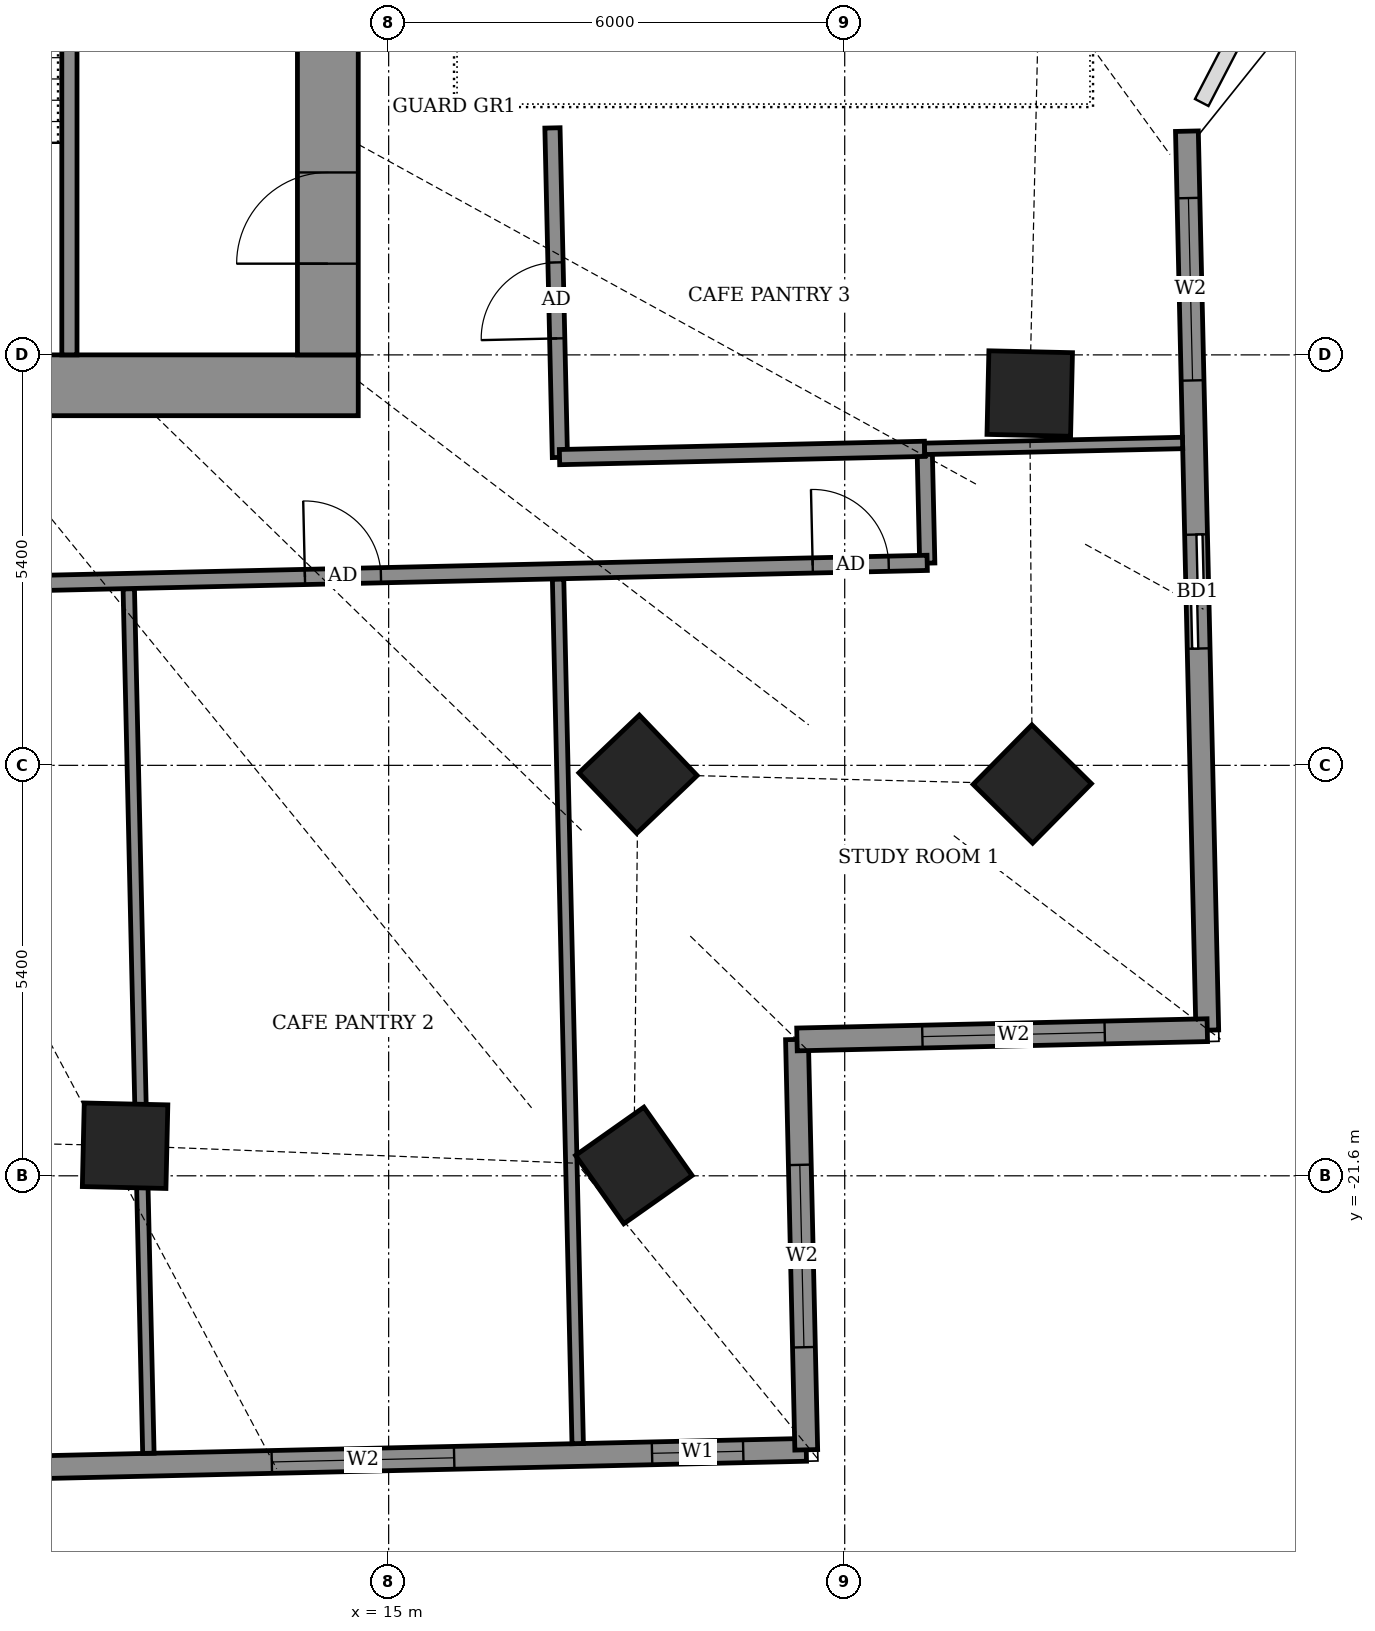
"""IFC4 building model, lengths in metres.
Left out: names, types, materials, properties, quantities, classifications, styles, units other than length and angle.
Written with IfcOpenShell. Run it as: python <this file> out.ifc"""

import sys

from ifc_helpers import new_model, si_unit, direction, frame, frame_2d, origin, origin_2d, place, context, subcontext, project, spatial, rectangle, extrude, element, fill, save


model = new_model("IFC4")
c1 = context("Model", 3, precision=1e-05, world=origin(), true_north=direction((0.0, 1.0)))
c2 = subcontext(c1, "Body", "Model", "MODEL_VIEW")
j1 = project(units=[si_unit("LENGTHUNIT", "METRE"), si_unit("PLANEANGLEUNIT", "RADIAN")], contexts=[c1])
p1 = place(None, origin())
s1 = spatial("IfcSite", under=j1, at=p1, CompositionType="ELEMENT")
p2 = place(p1, origin())
s2 = spatial("IfcBuilding", under=s1, at=p2, CompositionType="ELEMENT")
p3 = place(p2, frame((0.0, 0.0, 226.5)))
s3 = spatial("IfcBuildingStorey", under=s2, at=p3, CompositionType="ELEMENT", Elevation=226.5)
for number, where, z_axis, x_axis in (
    (1, (11.532, -21.204, -0.55), (0.0, 0.0, 1.0), (1.0, -0.023, 0.0)),
    (2, (18.226, -21.464, -0.55), (0.0, 0.0, 1.0), (0.817, 0.577, 0.0)),
    (3, (18.281, -16.316, -0.55), (0.0, 0.0, 1.0), (0.723, 0.691, 0.0)),
    (4, (23.468, -16.446, -0.55), (0.0, 0.0, 1.0), (0.702, 0.712, 0.0)),
    (5, (23.434, -11.309, -0.55), (0.0, 0.0, 1.0), (0.023, 1.0, 0.0)),
):
    element("IfcColumn", number, at=place(p3, frame(where, z_axis=z_axis, x_axis=x_axis)), inside=s3, PredefinedType="COLUMN", context=c2, shape_type="SweptSolid", body=[
        extrude(rectangle(XDim=1.1, YDim=1.1, at=origin_2d()), origin(), (0.0, 0.0, 1.0), 4.6),
    ])
p4 = place(p3, frame((25.77, -19.684, 0.0), z_axis=(0.0, 0.0, 1.0), x_axis=(-0.022659525999, 0.999743239978, 0.0)))
e6 = element("IfcWall", 6, at=p4, inside=s3, PredefinedType="SOLIDWALL", context=c2, shape_type="SweptSolid", body=[
    extrude(rectangle(XDim=11.83, YDim=0.3, at=frame_2d((5.915, 0.0))), origin(), (0.0, 0.0, 1.0), 2.85),
])
p5 = place(p4, frame((5.022, 0.0, 0.0)))
e7 = element("IfcOpeningElement", 7, at=p5, cuts=e6, PredefinedType="OPENING", context=c2, shape_type="SweptSolid", body=[
    extrude(rectangle(XDim=1.5, YDim=2.4, at=frame_2d((0.75, 1.2))), frame((0.0, 0.16, 0.0), z_axis=(0.0, -1.0, 0.0), x_axis=(1.0, 0.0, 0.0)), (0.0, 0.0, 1.0), 0.32),
])
p6 = place(p4, frame((8.55, 0.0, 0.9)))
e8 = element("IfcOpeningElement", 8, at=p6, cuts=e6, PredefinedType="OPENING", context=c2, shape_type="SweptSolid", body=[
    extrude(rectangle(XDim=2.4, YDim=1.5, at=frame_2d((1.2, 0.75))), frame((0.0, 0.16, 0.0), z_axis=(0.0, -1.0, 0.0), x_axis=(1.0, 0.0, 0.0)), (0.0, 0.0, 1.0), 0.32),
])
p7 = place(p3, frame((-23.403, -26.201, 0.0), z_axis=(0.0, 0.0, 1.0), x_axis=(0.999742770494, 0.022680230258, 0.0)))
e9 = element("IfcWall", 9, at=p7, inside=s3, PredefinedType="SOLIDWALL", context=c2, shape_type="SweptSolid", body=[
    extrude(rectangle(XDim=43.908, YDim=0.3, at=frame_2d((21.954, 0.0))), origin(), (0.0, 0.0, 1.0), 2.85),
])
p8 = place(p7, frame((2.0, 0.0, 0.0)))
e10 = element("IfcOpeningElement", 10, at=p8, cuts=e9, PredefinedType="OPENING", context=c2, shape_type="SweptSolid", body=[
    extrude(rectangle(XDim=1.5, YDim=2.4, at=frame_2d((0.75, 1.2))), frame((0.0, 0.16, 0.0), z_axis=(0.0, -1.0, 0.0), x_axis=(1.0, 0.0, 0.0)), (0.0, 0.0, 1.0), 0.32),
])
p9 = place(p7, frame((8.375, 0.0, 0.9)))
e11 = element("IfcOpeningElement", 11, at=p9, cuts=e9, PredefinedType="OPENING", context=c2, shape_type="SweptSolid", body=[
    extrude(rectangle(XDim=2.4, YDim=1.5, at=frame_2d((1.2, 0.75))), frame((0.0, 0.16, 0.0), z_axis=(0.0, -1.0, 0.0), x_axis=(1.0, 0.0, 0.0)), (0.0, 0.0, 1.0), 0.32),
])
p10 = place(p7, frame((15.2, 0.0, 0.0)))
e12 = element("IfcOpeningElement", 12, at=p10, cuts=e9, PredefinedType="OPENING", context=c2, shape_type="SweptSolid", body=[
    extrude(rectangle(XDim=1.5, YDim=2.4, at=frame_2d((0.75, 1.2))), frame((0.0, 0.16, 0.0), z_axis=(0.0, -1.0, 0.0), x_axis=(1.0, 0.0, 0.0)), (0.0, 0.0, 1.0), 0.32),
])
p11 = place(p7, frame((20.1, 0.0, 0.0)))
e13 = element("IfcOpeningElement", 13, at=p11, cuts=e9, PredefinedType="OPENING", context=c2, shape_type="SweptSolid", body=[
    extrude(rectangle(XDim=1.5, YDim=2.4, at=frame_2d((0.75, 1.2))), frame((0.0, 0.16, 0.0), z_axis=(0.0, -1.0, 0.0), x_axis=(1.0, 0.0, 0.0)), (0.0, 0.0, 1.0), 0.32),
])
p12 = place(p7, frame((24.975, 0.0, 0.0)))
e14 = element("IfcOpeningElement", 14, at=p12, cuts=e9, PredefinedType="OPENING", context=c2, shape_type="SweptSolid", body=[
    extrude(rectangle(XDim=1.5, YDim=2.4, at=frame_2d((0.75, 1.2))), frame((0.0, 0.16, 0.0), z_axis=(0.0, -1.0, 0.0), x_axis=(1.0, 0.0, 0.0)), (0.0, 0.0, 1.0), 0.32),
])
p13 = place(p7, frame((30.5, 0.0, 0.9)))
e15 = element("IfcOpeningElement", 15, at=p13, cuts=e9, PredefinedType="OPENING", context=c2, shape_type="SweptSolid", body=[
    extrude(rectangle(XDim=2.4, YDim=1.5, at=frame_2d((1.2, 0.75))), frame((0.0, 0.16, 0.0), z_axis=(0.0, -1.0, 0.0), x_axis=(1.0, 0.0, 0.0)), (0.0, 0.0, 1.0), 0.32),
])
p14 = place(p7, frame((36.875, 0.0, 0.9)))
e16 = element("IfcOpeningElement", 16, at=p14, cuts=e9, PredefinedType="OPENING", context=c2, shape_type="SweptSolid", body=[
    extrude(rectangle(XDim=2.4, YDim=1.5, at=frame_2d((1.2, 0.75))), frame((0.0, 0.16, 0.0), z_axis=(0.0, -1.0, 0.0), x_axis=(1.0, 0.0, 0.0)), (0.0, 0.0, 1.0), 0.32),
])
p15 = place(p7, frame((41.879, 0.0, 0.9)))
e17 = element("IfcOpeningElement", 17, at=p15, cuts=e9, PredefinedType="OPENING", context=c2, shape_type="SweptSolid", body=[
    extrude(rectangle(XDim=1.2, YDim=1.5, at=frame_2d((0.6, 0.75))), frame((0.0, 0.16, 0.0), z_axis=(0.0, -1.0, 0.0), x_axis=(1.0, 0.0, 0.0)), (0.0, 0.0, 1.0), 0.32),
])
p16 = place(p3, frame((20.494, -25.205, 0.0), z_axis=(0.0, 0.0, 1.0), x_axis=(-0.022558128916, 0.999745533033, 0.0)))
e18 = element("IfcWall", 18, at=p16, inside=s3, PredefinedType="SOLIDWALL", context=c2, shape_type="SweptSolid", body=[
    extrude(rectangle(XDim=5.401, YDim=0.3, at=frame_2d((2.7, 0.0))), origin(), (0.0, 0.0, 1.0), 2.85),
])
p17 = place(p16, frame((1.35, 0.0, 0.9)))
e19 = element("IfcOpeningElement", 19, at=p17, cuts=e18, PredefinedType="OPENING", context=c2, shape_type="SweptSolid", body=[
    extrude(rectangle(XDim=2.4, YDim=1.5, at=frame_2d((1.2, 0.75))), frame((0.0, 0.16, 0.0), z_axis=(0.0, -1.0, 0.0), x_axis=(1.0, 0.0, 0.0)), (0.0, 0.0, 1.0), 0.32),
])
p18 = place(p3, frame((20.372, -19.806, 0.0), z_axis=(0.0, 0.0, 1.0), x_axis=(0.999745417973, 0.02256322766, 0.0)))
e20 = element("IfcWall", 20, at=p18, inside=s3, PredefinedType="SOLIDWALL", context=c2, shape_type="SweptSolid", body=[
    extrude(rectangle(XDim=5.399, YDim=0.3, at=frame_2d((2.7, 0.0))), origin(), (0.0, 0.0, 1.0), 2.85),
])
p19 = place(p18, frame((1.65, 0.0, 0.9)))
e21 = element("IfcOpeningElement", 21, at=p19, cuts=e20, PredefinedType="OPENING", context=c2, shape_type="SweptSolid", body=[
    extrude(rectangle(XDim=2.4, YDim=1.5, at=frame_2d((1.2, 0.75))), frame((0.0, 0.16, 0.0), z_axis=(0.0, -1.0, 0.0), x_axis=(1.0, 0.0, 0.0)), (0.0, 0.0, 1.0), 0.32),
])
p20 = place(p3, frame((11.839, -25.251, 0.0), z_axis=(0.0, 0.0, 1.0), x_axis=(-0.022684355347, 0.999742676904, 0.0)))
e22 = element("IfcWall", 22, at=p20, inside=s3, PredefinedType="PARTITIONING", context=c2, shape_type="SweptSolid", body=[
    extrude(rectangle(XDim=11.376, YDim=0.15, at=frame_2d((5.688, 0.0))), origin(), (0.0, 0.0, 1.0), 2.85),
])
p21 = place(p3, frame((17.487, -25.123, 0.0), z_axis=(0.0, 0.0, 1.0), x_axis=(-0.022684355347, 0.999742676904, 0.0)))
e23 = element("IfcWall", 23, at=p21, inside=s3, PredefinedType="PARTITIONING", context=c2, shape_type="SweptSolid", body=[
    extrude(rectangle(XDim=11.376, YDim=0.15, at=frame_2d((5.688, 0.0))), origin(), (0.0, 0.0, 1.0), 2.55),
])
p22 = place(p3, frame((22.086, -13.54, 0.0), z_axis=(0.0, 0.0, 1.0), x_axis=(-0.022617910375, 0.999744182344, 0.0)))
e24 = element("IfcWall", 24, at=p22, inside=s3, PredefinedType="PARTITIONING", context=c2, shape_type="SweptSolid", body=[
    extrude(rectangle(XDim=1.5, YDim=0.2, at=frame_2d((0.75, 0.0))), origin(), (0.0, 0.0, 1.0), 2.85),
])
p23 = place(p3, frame((-27.016, -14.65, 0.0), z_axis=(0.0, 0.0, 1.0), x_axis=(0.999742722722, 0.022682335961, 0.0)))
e25 = element("IfcWall", 25, at=p23, inside=s3, PredefinedType="PARTITIONING", context=c2, shape_type="SweptSolid", body=[
    extrude(rectangle(XDim=49.114, YDim=0.2, at=frame_2d((24.557, 0.0))), origin(), (0.0, 0.0, 1.0), 2.55),
])
p24 = place(p23, frame((2.0, 0.0, 0.0)))
e26 = element("IfcOpeningElement", 26, at=p24, cuts=e25, PredefinedType="OPENING", context=c2, shape_type="SweptSolid", body=[
    extrude(rectangle(XDim=1.0, YDim=2.1, at=frame_2d((0.5, 1.05))), frame((0.0, 0.11, 0.0), z_axis=(0.0, -1.0, 0.0), x_axis=(1.0, 0.0, 0.0)), (0.0, 0.0, 1.0), 0.22),
])
p25 = place(p23, frame((7.35, 0.0, 0.0)))
e27 = element("IfcOpeningElement", 27, at=p25, cuts=e25, PredefinedType="OPENING", context=c2, shape_type="SweptSolid", body=[
    extrude(rectangle(XDim=0.9, YDim=2.1, at=frame_2d((0.45, 1.05))), frame((0.0, 0.11, 0.0), z_axis=(0.0, -1.0, 0.0), x_axis=(1.0, 0.0, 0.0)), (0.0, 0.0, 1.0), 0.22),
])
p26 = place(p23, frame((13.725, 0.0, 0.0)))
e28 = element("IfcOpeningElement", 28, at=p26, cuts=e25, PredefinedType="OPENING", context=c2, shape_type="SweptSolid", body=[
    extrude(rectangle(XDim=1.0, YDim=2.1, at=frame_2d((0.5, 1.05))), frame((0.0, 0.11, 0.0), z_axis=(0.0, -1.0, 0.0), x_axis=(1.0, 0.0, 0.0)), (0.0, 0.0, 1.0), 0.22),
])
p27 = place(p23, frame((9.85, 0.0, 0.0)))
e29 = element("IfcOpeningElement", 29, at=p27, cuts=e25, PredefinedType="OPENING", context=c2, shape_type="SweptSolid", body=[
    extrude(rectangle(XDim=0.9, YDim=2.1, at=frame_2d((0.45, 1.05))), frame((0.0, 0.11, 0.0), z_axis=(0.0, -1.0, 0.0), x_axis=(1.0, 0.0, 0.0)), (0.0, 0.0, 1.0), 0.22),
])
p28 = place(p23, frame((17.65, 0.0, 0.0)))
e30 = element("IfcOpeningElement", 30, at=p28, cuts=e25, PredefinedType="OPENING", context=c2, shape_type="SweptSolid", body=[
    extrude(rectangle(XDim=0.9, YDim=2.1, at=frame_2d((0.45, 1.05))), frame((0.0, 0.11, 0.0), z_axis=(0.0, -1.0, 0.0), x_axis=(1.0, 0.0, 0.0)), (0.0, 0.0, 1.0), 0.22),
])
p29 = place(p23, frame((24.95, 0.0, 0.0)))
e31 = element("IfcOpeningElement", 31, at=p29, cuts=e25, PredefinedType="OPENING", context=c2, shape_type="SweptSolid", body=[
    extrude(rectangle(XDim=0.9, YDim=2.1, at=frame_2d((0.45, 1.05))), frame((0.0, 0.11, 0.0), z_axis=(0.0, -1.0, 0.0), x_axis=(1.0, 0.0, 0.0)), (0.0, 0.0, 1.0), 0.22),
])
p30 = place(p23, frame((27.425, 0.0, 0.0)))
e32 = element("IfcOpeningElement", 32, at=p30, cuts=e25, PredefinedType="OPENING", context=c2, shape_type="SweptSolid", body=[
    extrude(rectangle(XDim=0.9, YDim=2.1, at=frame_2d((0.45, 1.05))), frame((0.0, 0.11, 0.0), z_axis=(0.0, -1.0, 0.0), x_axis=(1.0, 0.0, 0.0)), (0.0, 0.0, 1.0), 0.22),
])
p31 = place(p23, frame((35.75, 0.0, 0.0)))
e33 = element("IfcOpeningElement", 33, at=p31, cuts=e25, PredefinedType="OPENING", context=c2, shape_type="SweptSolid", body=[
    extrude(rectangle(XDim=1.0, YDim=2.1, at=frame_2d((0.5, 1.05))), frame((0.0, 0.11, 0.0), z_axis=(0.0, -1.0, 0.0), x_axis=(1.0, 0.0, 0.0)), (0.0, 0.0, 1.0), 0.22),
])
p32 = place(p23, frame((32.25, 0.0, 0.0)))
e34 = element("IfcOpeningElement", 34, at=p32, cuts=e25, PredefinedType="OPENING", context=c2, shape_type="SweptSolid", body=[
    extrude(rectangle(XDim=0.9, YDim=2.1, at=frame_2d((0.45, 1.05))), frame((0.0, 0.11, 0.0), z_axis=(0.0, -1.0, 0.0), x_axis=(1.0, 0.0, 0.0)), (0.0, 0.0, 1.0), 0.22),
])
p33 = place(p23, frame((40.925, 0.0, 0.0)))
e35 = element("IfcOpeningElement", 35, at=p33, cuts=e25, PredefinedType="OPENING", context=c2, shape_type="SweptSolid", body=[
    extrude(rectangle(XDim=1.0, YDim=2.1, at=frame_2d((0.5, 1.05))), frame((0.0, 0.11, 0.0), z_axis=(0.0, -1.0, 0.0), x_axis=(1.0, 0.0, 0.0)), (0.0, 0.0, 1.0), 0.22),
])
p34 = place(p23, frame((47.607, 0.0, 0.0)))
e36 = element("IfcOpeningElement", 36, at=p34, cuts=e25, PredefinedType="OPENING", context=c2, shape_type="SweptSolid", body=[
    extrude(rectangle(XDim=1.0, YDim=2.1, at=frame_2d((0.5, 1.05))), frame((0.0, 0.11, 0.0), z_axis=(0.0, -1.0, 0.0), x_axis=(1.0, 0.0, 0.0)), (0.0, 0.0, 1.0), 0.22),
])
p35 = place(p3, frame((17.253, -12.149, 0.0), z_axis=(0.0, 0.0, 1.0), x_axis=(-0.022578158225, 0.999745080894, 0.0)))
e37 = element("IfcWall", 37, at=p35, inside=s3, PredefinedType="PARTITIONING", context=c2, shape_type="SweptSolid", body=[
    extrude(rectangle(XDim=4.336, YDim=0.2, at=frame_2d((2.168, 0.0))), origin(), (0.0, 0.0, 1.0), 2.85),
])
p36 = place(p35, frame((1.566, 0.0, 0.0)))
e38 = element("IfcOpeningElement", 38, at=p36, cuts=e37, PredefinedType="OPENING", context=c2, shape_type="SweptSolid", body=[
    extrude(rectangle(XDim=1.0, YDim=2.1, at=frame_2d((0.5, 1.05))), frame((0.0, 0.11, 0.0), z_axis=(0.0, -1.0, 0.0), x_axis=(1.0, 0.0, 0.0)), (0.0, 0.0, 1.0), 0.22),
])
p37 = place(p3, frame((17.248, -12.145, 0.0), z_axis=(0.0, 0.0, 1.0), x_axis=(0.999741966705, 0.022715633565, 0.0)))
e39 = element("IfcWall", 39, at=p37, inside=s3, PredefinedType="PARTITIONING", context=c2, shape_type="SweptSolid", body=[
    extrude(rectangle(XDim=4.804, YDim=0.2, at=frame_2d((2.402, 0.0))), origin(), (0.0, 0.0, 1.0), 2.85),
])
p38 = place(p3, frame((22.051, -12.036, 0.0), z_axis=(0.0, 0.0, 1.0), x_axis=(0.999743392495, 0.022652795902, 0.0)))
e40 = element("IfcWall", 40, at=p38, inside=s3, PredefinedType="PARTITIONING", context=c2, shape_type="SweptSolid", body=[
    extrude(rectangle(XDim=3.395, YDim=0.15, at=frame_2d((1.698, 0.0))), origin(), (0.0, 0.0, 1.0), 2.55),
])
p39 = place(p3, frame((-14.6, -11.2, 0.0), z_axis=(0.0, 0.0, 1.0), x_axis=(1.0, 0.0, 0.0)))
e41 = element("IfcWall", 41, at=p39, inside=s3, PredefinedType="SHEAR", context=c2, shape_type="SweptSolid", body=[
    extrude(rectangle(XDim=29.2, YDim=0.8, at=frame_2d((14.6, 0.0))), origin(), (0.0, 0.0, 1.0), 4.6),
])
p40 = place(p3, frame((14.2, -10.8, 0.0), z_axis=(0.0, 0.0, 1.0), x_axis=(0.0, 1.0, 0.0)))
e42 = element("IfcWall", 42, at=p40, inside=s3, PredefinedType="SHEAR", context=c2, shape_type="SweptSolid", body=[
    extrude(rectangle(XDim=21.6, YDim=0.8, at=frame_2d((10.8, 0.0))), origin(), (0.0, 0.0, 1.0), 4.6),
])
p41 = place(p40, frame((1.2, 0.0, 0.0)))
e43 = element("IfcOpeningElement", 43, at=p41, cuts=e42, PredefinedType="OPENING", context=c2, shape_type="SweptSolid", body=[
    extrude(rectangle(XDim=1.2, YDim=2.1, at=frame_2d((0.6, 1.05))), frame((0.0, 0.41, 0.0), z_axis=(0.0, -1.0, 0.0), x_axis=(1.0, 0.0, 0.0)), (0.0, 0.0, 1.0), 0.82),
])
p42 = place(p3, frame((10.8, -10.8, 0.0), z_axis=(0.0, 0.0, 1.0), x_axis=(0.0, 1.0, 0.0)))
e44 = element("IfcWall", 44, at=p42, inside=s3, PredefinedType="SHEAR", context=c2, shape_type="SweptSolid", body=[
    extrude(rectangle(XDim=7.5, YDim=0.2, at=frame_2d((3.75, 0.0))), origin(), (0.0, 0.0, 1.0), 4.05),
])
p43 = place(p5, origin())
e45 = element("IfcDoor", 45, at=p43, inside=s3, OperationType="SLIDING_TO_LEFT", PredefinedType="DOOR", context=c2, shape_type="SweptSolid", body=[
    extrude(rectangle(XDim=1.5, YDim=2.4, at=frame_2d((0.75, 1.2))), frame((0.0, 0.025, 0.0), z_axis=(0.0, -1.0, 0.0), x_axis=(1.0, 0.0, 0.0)), (0.0, 0.0, 1.0), 0.05),
])
fill(e7, e45)
p44 = place(p6, origin())
e46 = element("IfcWindow", 46, at=p44, inside=s3, PartitioningType="DOUBLE_PANEL_VERTICAL", PredefinedType="WINDOW", context=c2, shape_type="SweptSolid", body=[
    extrude(rectangle(XDim=2.4, YDim=1.5, at=frame_2d((1.2, 0.75))), frame((0.0, 0.03, 0.0), z_axis=(0.0, -1.0, 0.0), x_axis=(1.0, 0.0, 0.0)), (0.0, 0.0, 1.0), 0.06),
])
fill(e8, e46)
p45 = place(p14, origin())
e47 = element("IfcWindow", 47, at=p45, inside=s3, PartitioningType="DOUBLE_PANEL_VERTICAL", PredefinedType="WINDOW", context=c2, shape_type="SweptSolid", body=[
    extrude(rectangle(XDim=2.4, YDim=1.5, at=frame_2d((1.2, 0.75))), frame((0.0, 0.03, 0.0), z_axis=(0.0, -1.0, 0.0), x_axis=(1.0, 0.0, 0.0)), (0.0, 0.0, 1.0), 0.06),
])
fill(e16, e47)
p46 = place(p15, origin())
e48 = element("IfcWindow", 48, at=p46, inside=s3, PartitioningType="SINGLE_PANEL", PredefinedType="WINDOW", context=c2, shape_type="SweptSolid", body=[
    extrude(rectangle(XDim=1.2, YDim=1.5, at=frame_2d((0.6, 0.75))), frame((0.0, 0.03, 0.0), z_axis=(0.0, -1.0, 0.0), x_axis=(1.0, 0.0, 0.0)), (0.0, 0.0, 1.0), 0.06),
])
fill(e17, e48)
p47 = place(p17, origin())
e49 = element("IfcWindow", 49, at=p47, inside=s3, PartitioningType="DOUBLE_PANEL_VERTICAL", PredefinedType="WINDOW", context=c2, shape_type="SweptSolid", body=[
    extrude(rectangle(XDim=2.4, YDim=1.5, at=frame_2d((1.2, 0.75))), frame((0.0, 0.03, 0.0), z_axis=(0.0, -1.0, 0.0), x_axis=(1.0, 0.0, 0.0)), (0.0, 0.0, 1.0), 0.06),
])
fill(e19, e49)
p48 = place(p19, origin())
e50 = element("IfcWindow", 50, at=p48, inside=s3, PartitioningType="DOUBLE_PANEL_VERTICAL", PredefinedType="WINDOW", context=c2, shape_type="SweptSolid", body=[
    extrude(rectangle(XDim=2.4, YDim=1.5, at=frame_2d((1.2, 0.75))), frame((0.0, 0.03, 0.0), z_axis=(0.0, -1.0, 0.0), x_axis=(1.0, 0.0, 0.0)), (0.0, 0.0, 1.0), 0.06),
])
fill(e21, e50)
p49 = place(p33, origin())
e51 = element("IfcDoor", 51, at=p49, inside=s3, OperationType="SINGLE_SWING_RIGHT", PredefinedType="DOOR", context=c2, shape_type="SweptSolid", body=[
    extrude(rectangle(XDim=1.0, YDim=2.1, at=frame_2d((0.5, 1.05))), frame((0.0, 0.025, 0.0), z_axis=(0.0, -1.0, 0.0), x_axis=(1.0, 0.0, 0.0)), (0.0, 0.0, 1.0), 0.05),
])
fill(e35, e51)
p50 = place(p34, origin())
e52 = element("IfcDoor", 52, at=p50, inside=s3, OperationType="SINGLE_SWING_LEFT", PredefinedType="DOOR", context=c2, shape_type="SweptSolid", body=[
    extrude(rectangle(XDim=1.0, YDim=2.1, at=frame_2d((0.5, 1.05))), frame((0.0, 0.025, 0.0), z_axis=(0.0, -1.0, 0.0), x_axis=(1.0, 0.0, 0.0)), (0.0, 0.0, 1.0), 0.05),
])
fill(e36, e52)
p51 = place(p36, origin())
e53 = element("IfcDoor", 53, at=p51, inside=s3, OperationType="SINGLE_SWING_RIGHT", PredefinedType="DOOR", context=c2, shape_type="SweptSolid", body=[
    extrude(rectangle(XDim=1.0, YDim=2.1, at=frame_2d((0.5, 1.05))), frame((0.0, 0.025, 0.0), z_axis=(0.0, -1.0, 0.0), x_axis=(1.0, 0.0, 0.0)), (0.0, 0.0, 1.0), 0.05),
])
fill(e38, e53)
p52 = place(p41, origin())
e54 = element("IfcDoor", 54, at=p52, inside=s3, OperationType="DOUBLE_DOOR_SINGLE_SWING", PredefinedType="DOOR", context=c2, shape_type="SweptSolid", body=[
    extrude(rectangle(XDim=1.2, YDim=2.1, at=frame_2d((0.6, 1.05))), frame((0.0, 0.025, 0.0), z_axis=(0.0, -1.0, 0.0), x_axis=(1.0, 0.0, 0.0)), (0.0, 0.0, 1.0), 0.05),
])
fill(e43, e54)
save(model, sys.argv[1])
